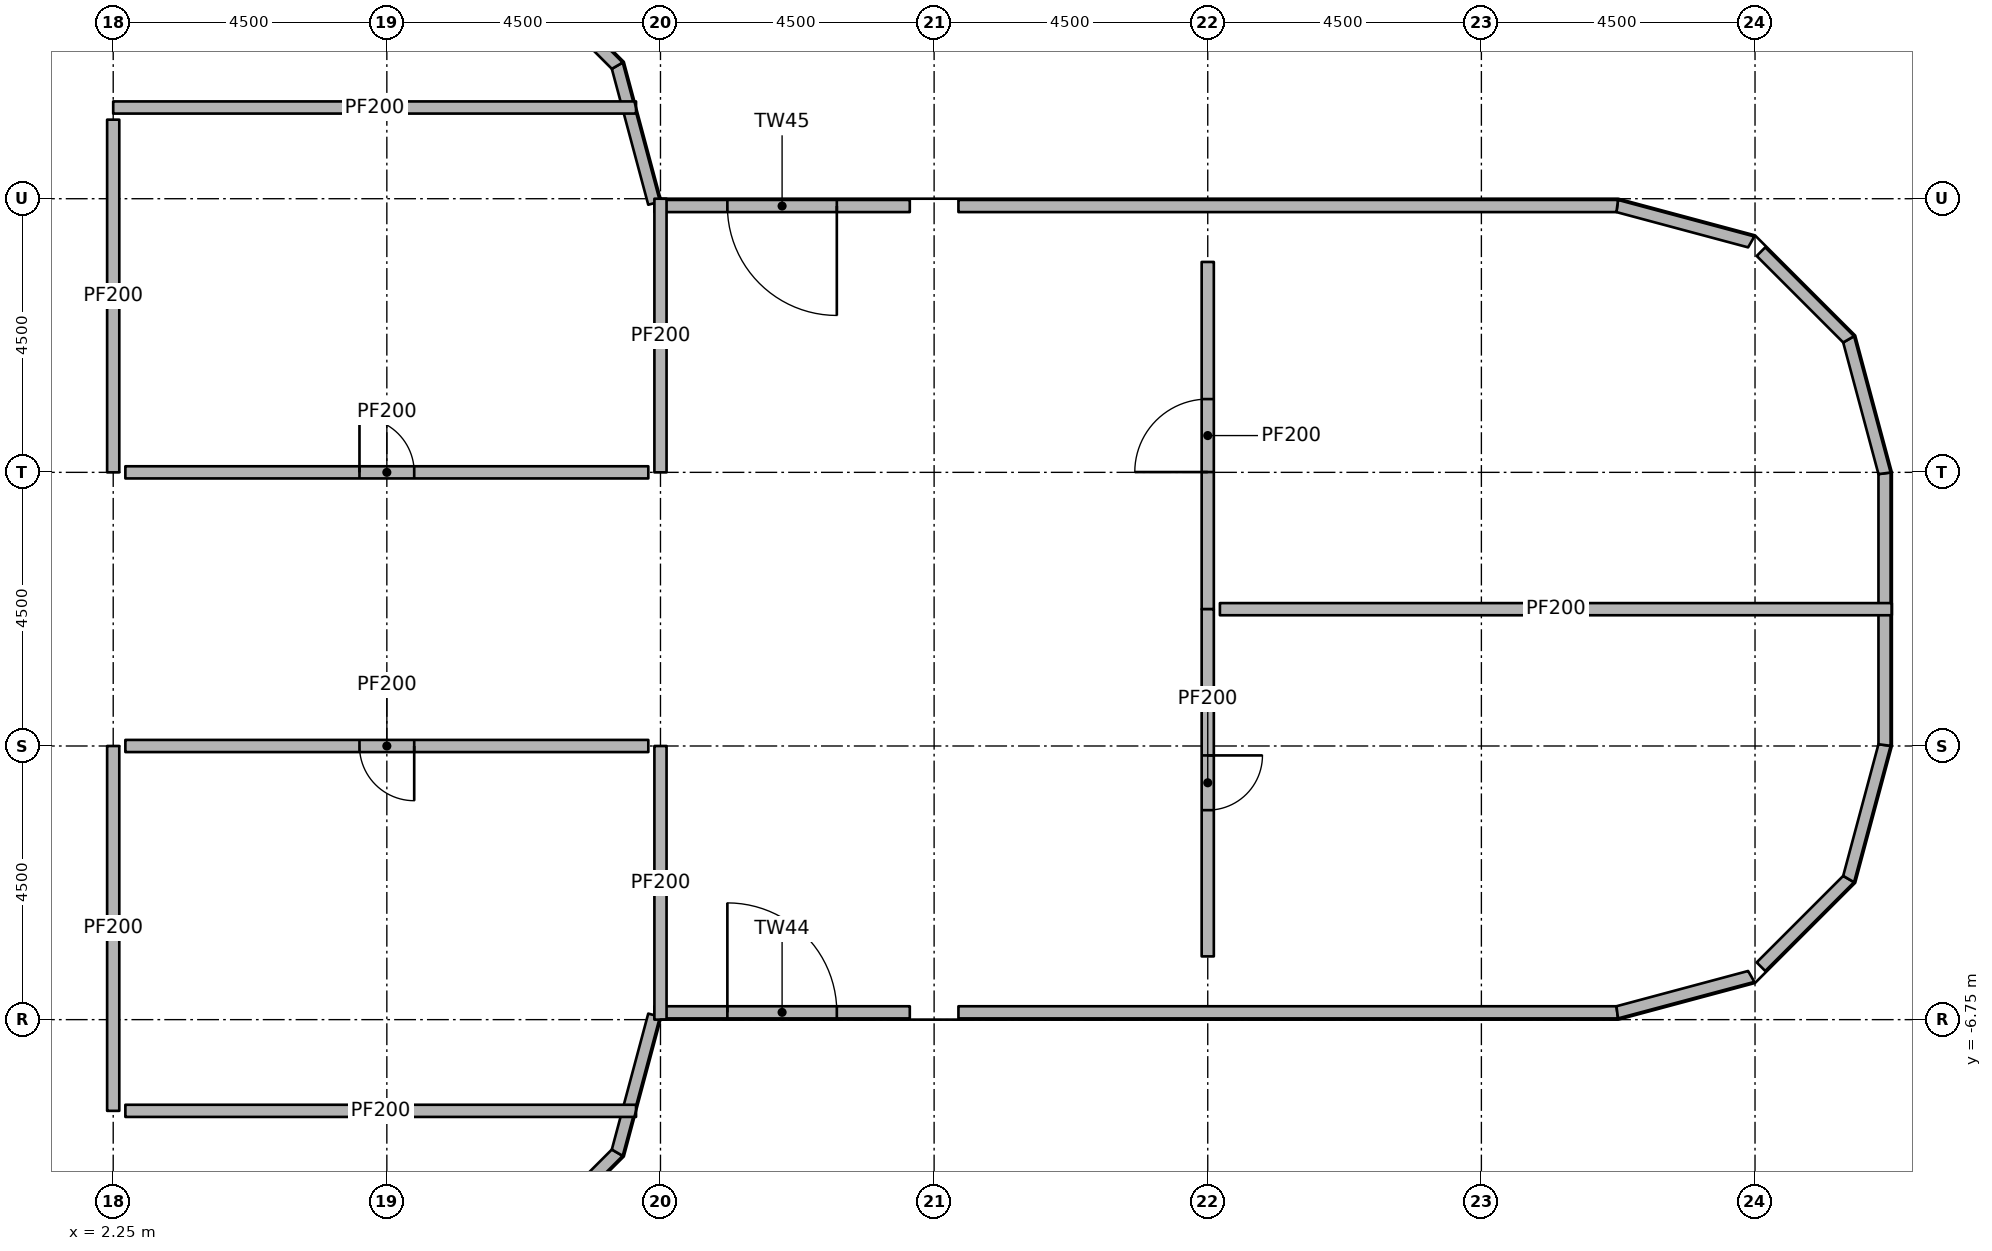
"""IFC4 building model, lengths in metres.
Left out: names, types, materials, properties, quantities, classifications, styles, units other than length and angle.
Written with IfcOpenShell. Run it as: python <this file> out.ifc"""

import sys

from ifc_helpers import new_model, si_unit, direction, frame, frame_2d, origin, origin_2d, place, context, subcontext, project, spatial, polyline, rectangle, outline, extrude, element, fill, save


model = new_model("IFC4")
c1 = context("Model", 3, precision=1e-05, world=origin(), true_north=direction((0.0, 1.0)))
c2 = subcontext(c1, "Body", "Model", "MODEL_VIEW")
j1 = project(units=[si_unit("LENGTHUNIT", "METRE"), si_unit("PLANEANGLEUNIT", "RADIAN")], contexts=[c1])
p1 = place(None, origin())
s1 = spatial("IfcSite", under=j1, at=p1, CompositionType="ELEMENT")
p2 = place(p1, origin())
s2 = spatial("IfcBuilding", under=s1, at=p2, CompositionType="ELEMENT")
p3 = place(p2, frame((0.0, 0.0, 190.4)))
s3 = spatial("IfcBuildingStorey", under=s2, at=p3, CompositionType="ELEMENT", Elevation=190.4)
for number, where, z_axis, x_axis in (
    (1, (6.25, -6.25, 0.0), (0.0, 0.0, 1.0), (1.0, 0.0, 0.0)),
    (2, (6.25, 6.25, 0.0), (0.0, 0.0, 1.0), (1.0, 0.0, 0.0)),
    (3, (10.75, -6.25, 0.0), (0.0, 0.0, 1.0), (1.0, 0.0, 0.0)),
    (4, (10.75, 6.25, 0.0), (0.0, 0.0, 1.0), (1.0, 0.0, 0.0)),
    (5, (15.75, -6.25, 0.0), (0.0, 0.0, 1.0), (1.0, 0.0, 0.0)),
    (6, (15.75, 6.25, 0.0), (0.0, 0.0, 1.0), (1.0, 0.0, 0.0)),
    (7, (20.25, -6.11, 0.0), (0.0, 0.0, 1.0), (1.0, 0.0, 0.0)),
    (8, (20.25, 6.11, 0.0), (0.0, 0.0, 1.0), (1.0, 0.0, 0.0)),
    (9, (24.75, -6.11, 0.0), (0.0, 0.0, 1.0), (1.0, 0.0, 0.0)),
    (10, (24.75, 6.11, 0.0), (0.0, 0.0, 1.0), (1.0, 0.0, 0.0)),
    (11, (28.908, -5.475, 0.0), (0.0, 0.0, 1.0), (1.0, 0.0, 0.0)),
    (12, (28.67, -2.25, 0.0), (0.0, 0.0, 1.0), (1.0, 0.0, 0.0)),
    (13, (28.67, 2.25, 0.0), (0.0, 0.0, 1.0), (1.0, 0.0, 0.0)),
    (14, (28.908, 5.475, 0.0), (0.0, 0.0, 1.0), (1.0, 0.0, 0.0)),
):
    element("IfcColumn", number, at=place(p3, frame(where, z_axis=z_axis, x_axis=x_axis)), inside=s3, PredefinedType="COLUMN", context=c2, shape_type="SweptSolid", body=[
        extrude(rectangle(XDim=0.8, YDim=0.8, at=origin_2d()), origin(), (0.0, 0.0, 1.0), 4.85),
    ])
p4 = place(p3, origin())
e15 = element("IfcWall", 15, at=p4, inside=s3, PredefinedType="SOLIDWALL", context=c2, shape_type="SweptSolid", body=[
    extrude(outline(polyline([(8.99, -10.629), (10.629, -8.99), (10.45, -8.886), (8.886, -10.45), (8.99, -10.629)])), origin(), (0.0, 0.0, 1.0), 4.85),
])
p5 = place(p3, origin())
e16 = element("IfcWall", 16, at=p5, inside=s3, PredefinedType="SOLIDWALL", context=c2, shape_type="SweptSolid", body=[
    extrude(outline(polyline([(10.629, -8.99), (11.242, -6.702), (11.049, -6.651), (10.45, -8.886), (10.629, -8.99)])), origin(), (0.0, 0.0, 1.0), 4.85),
])
p6 = place(p3, frame((11.15, -6.63, 0.0), z_axis=(0.0, 0.0, 1.0), x_axis=(1.0, 0.0, 0.0)))
e17 = element("IfcWall", 17, at=p6, inside=s3, PredefinedType="SOLIDWALL", context=c2, shape_type="SweptSolid", body=[
    extrude(rectangle(XDim=4.2, YDim=0.2, at=frame_2d((2.1, 0.0))), origin(), (0.0, 0.0, 1.0), 4.85),
])
p7 = place(p6, frame((1.2, 0.0, 0.0)))
e18 = element("IfcOpeningElement", 18, at=p7, cuts=e17, PredefinedType="OPENING", context=c2, shape_type="SweptSolid", body=[
    extrude(rectangle(XDim=1.8, YDim=2.4, at=frame_2d((0.9, 1.2))), frame((0.0, 0.11, 0.0), z_axis=(0.0, -1.0, 0.0), x_axis=(1.0, 0.0, 0.0)), (0.0, 0.0, 1.0), 0.22),
])
p8 = place(p3, origin())
e19 = element("IfcWall", 19, at=p8, inside=s3, PredefinedType="SOLIDWALL", context=c2, shape_type="SweptSolid", body=[
    extrude(outline(polyline([(16.15, -6.73), (26.997, -6.73), (26.971, -6.53), (16.15, -6.53), (16.15, -6.73)])), origin(), (0.0, 0.0, 1.0), 4.85),
])
p9 = place(p3, origin())
e20 = element("IfcWall", 20, at=p9, inside=s3, PredefinedType="SOLIDWALL", context=c2, shape_type="SweptSolid", body=[
    extrude(outline(polyline([(26.997, -6.73), (29.24, -6.129), (29.136, -5.95), (26.971, -6.53), (26.997, -6.73)])), origin(), (0.0, 0.0, 1.0), 4.85),
])
p10 = place(p3, origin())
e21 = element("IfcWall", 21, at=p10, inside=s3, PredefinedType="SOLIDWALL", context=c2, shape_type="SweptSolid", body=[
    extrude(outline(polyline([(29.419, -5.95), (30.879, -4.49), (30.7, -4.386), (29.277, -5.809), (29.419, -5.95)])), origin(), (0.0, 0.0, 1.0), 4.85),
])
p11 = place(p3, origin())
e22 = element("IfcWall", 22, at=p11, inside=s3, PredefinedType="SOLIDWALL", context=c2, shape_type="SweptSolid", body=[
    extrude(outline(polyline([(30.879, -4.49), (31.48, -2.247), (31.28, -2.221), (30.7, -4.386), (30.879, -4.49)])), origin(), (0.0, 0.0, 1.0), 4.85),
])
p12 = place(p3, origin())
e23 = element("IfcWall", 23, at=p12, inside=s3, PredefinedType="SOLIDWALL", context=c2, shape_type="SweptSolid", body=[
    extrude(outline(polyline([(31.48, -2.247), (31.48, 2.247), (31.28, 2.221), (31.28, -2.221), (31.48, -2.247)])), origin(), (0.0, 0.0, 1.0), 4.85),
])
p13 = place(p3, origin())
e24 = element("IfcWall", 24, at=p13, inside=s3, PredefinedType="SOLIDWALL", context=c2, shape_type="SweptSolid", body=[
    extrude(outline(polyline([(31.48, 2.247), (30.879, 4.49), (30.7, 4.386), (31.28, 2.221), (31.48, 2.247)])), origin(), (0.0, 0.0, 1.0), 4.85),
])
p14 = place(p3, origin())
e25 = element("IfcWall", 25, at=p14, inside=s3, PredefinedType="SOLIDWALL", context=c2, shape_type="SweptSolid", body=[
    extrude(outline(polyline([(30.879, 4.49), (29.419, 5.95), (29.277, 5.809), (30.7, 4.386), (30.879, 4.49)])), origin(), (0.0, 0.0, 1.0), 4.85),
])
p15 = place(p3, origin())
e26 = element("IfcWall", 26, at=p15, inside=s3, PredefinedType="SOLIDWALL", context=c2, shape_type="SweptSolid", body=[
    extrude(outline(polyline([(29.24, 6.129), (26.997, 6.73), (26.971, 6.53), (29.136, 5.95), (29.24, 6.129)])), origin(), (0.0, 0.0, 1.0), 4.85),
])
p16 = place(p3, origin())
e27 = element("IfcWall", 27, at=p16, inside=s3, PredefinedType="SOLIDWALL", context=c2, shape_type="SweptSolid", body=[
    extrude(outline(polyline([(26.997, 6.73), (16.15, 6.73), (16.15, 6.53), (26.971, 6.53), (26.997, 6.73)])), origin(), (0.0, 0.0, 1.0), 4.85),
])
p17 = place(p3, frame((15.35, 6.63, 0.0), z_axis=(0.0, 0.0, 1.0), x_axis=(-1.0, 0.0, 0.0)))
e28 = element("IfcWall", 28, at=p17, inside=s3, PredefinedType="SOLIDWALL", context=c2, shape_type="SweptSolid", body=[
    extrude(rectangle(XDim=4.2, YDim=0.2, at=frame_2d((2.1, 0.0))), origin(), (0.0, 0.0, 1.0), 4.85),
])
p18 = place(p17, frame((1.2, 0.0, 0.0)))
e29 = element("IfcOpeningElement", 29, at=p18, cuts=e28, PredefinedType="OPENING", context=c2, shape_type="SweptSolid", body=[
    extrude(rectangle(XDim=1.8, YDim=2.4, at=frame_2d((0.9, 1.2))), frame((0.0, 0.11, 0.0), z_axis=(0.0, -1.0, 0.0), x_axis=(1.0, 0.0, 0.0)), (0.0, 0.0, 1.0), 0.22),
])
p19 = place(p3, origin())
e30 = element("IfcWall", 30, at=p19, inside=s3, PredefinedType="SOLIDWALL", context=c2, shape_type="SweptSolid", body=[
    extrude(outline(polyline([(11.242, 6.702), (10.629, 8.99), (10.45, 8.886), (11.049, 6.651), (11.242, 6.702)])), origin(), (0.0, 0.0, 1.0), 4.85),
])
p20 = place(p3, origin())
e31 = element("IfcWall", 31, at=p20, inside=s3, PredefinedType="SOLIDWALL", context=c2, shape_type="SweptSolid", body=[
    extrude(outline(polyline([(10.629, 8.99), (8.99, 10.629), (8.886, 10.45), (10.45, 8.886), (10.629, 8.99)])), origin(), (0.0, 0.0, 1.0), 4.85),
])
p21 = place(p3, frame((10.848, 8.25, 0.0), z_axis=(0.0, 0.0, 1.0), x_axis=(-1.0, 0.0, 0.0)))
e32 = element("IfcWall", 32, at=p21, inside=s3, PredefinedType="PARTITIONING", context=c2, shape_type="SweptSolid", body=[
    extrude(rectangle(XDim=8.598, YDim=0.2, at=frame_2d((4.299, 0.0))), origin(), (0.0, 0.0, 1.0), 3.93),
])
p22 = place(p3, frame((2.25, 8.05, 0.0), z_axis=(0.0, 0.0, 1.0), x_axis=(0.0, -1.0, 0.0)))
e33 = element("IfcWall", 33, at=p22, inside=s3, PredefinedType="PARTITIONING", context=c2, shape_type="SweptSolid", body=[
    extrude(rectangle(XDim=5.8, YDim=0.2, at=frame_2d((2.9, 0.0))), origin(), (0.0, 0.0, 1.0), 3.994),
])
p23 = place(p3, frame((2.25, -2.25, 0.0), z_axis=(0.0, 0.0, 1.0), x_axis=(0.0, -1.0, 0.0)))
e34 = element("IfcWall", 34, at=p23, inside=s3, PredefinedType="PARTITIONING", context=c2, shape_type="SweptSolid", body=[
    extrude(rectangle(XDim=6.0, YDim=0.2, at=frame_2d((3.0, 0.0))), origin(), (0.0, 0.0, 1.0), 3.994),
])
p24 = place(p3, frame((2.45, -8.25, 0.0), z_axis=(0.0, 0.0, 1.0), x_axis=(1.0, 0.0, 0.0)))
e35 = element("IfcWall", 35, at=p24, inside=s3, PredefinedType="PARTITIONING", context=c2, shape_type="SweptSolid", body=[
    extrude(rectangle(XDim=8.398, YDim=0.2, at=frame_2d((4.199, 0.0))), origin(), (0.0, 0.0, 1.0), 3.93),
])
p25 = place(p3, frame((11.25, 6.75, 0.0), z_axis=(0.0, 0.0, 1.0), x_axis=(0.0, -1.0, 0.0)))
e36 = element("IfcWall", 36, at=p25, inside=s3, PredefinedType="PARTITIONING", context=c2, shape_type="SweptSolid", body=[
    extrude(rectangle(XDim=4.5, YDim=0.2, at=frame_2d((2.25, 0.0))), origin(), (0.0, 0.0, 1.0), 3.93),
])
p26 = place(p3, frame((2.45, 2.25, 0.0), z_axis=(0.0, 0.0, 1.0), x_axis=(1.0, 0.0, 0.0)))
e37 = element("IfcWall", 37, at=p26, inside=s3, PredefinedType="PARTITIONING", context=c2, shape_type="SweptSolid", body=[
    extrude(rectangle(XDim=8.6, YDim=0.2, at=frame_2d((4.3, 0.0))), origin(), (0.0, 0.0, 1.0), 4.152),
])
p27 = place(p26, frame((3.85, 0.0, 0.0)))
e38 = element("IfcOpeningElement", 38, at=p27, cuts=e37, PredefinedType="OPENING", context=c2, shape_type="SweptSolid", body=[
    extrude(rectangle(XDim=0.9, YDim=2.1, at=frame_2d((0.45, 1.05))), frame((0.0, 0.11, 0.0), z_axis=(0.0, -1.0, 0.0), x_axis=(1.0, 0.0, 0.0)), (0.0, 0.0, 1.0), 0.22),
])
p28 = place(p3, frame((11.25, -2.25, 0.0), z_axis=(0.0, 0.0, 1.0), x_axis=(0.0, -1.0, 0.0)))
e39 = element("IfcWall", 39, at=p28, inside=s3, PredefinedType="PARTITIONING", context=c2, shape_type="SweptSolid", body=[
    extrude(rectangle(XDim=4.5, YDim=0.2, at=frame_2d((2.25, 0.0))), origin(), (0.0, 0.0, 1.0), 3.93),
])
p29 = place(p3, frame((11.05, -2.25, 0.0), z_axis=(0.0, 0.0, 1.0), x_axis=(-1.0, 0.0, 0.0)))
e40 = element("IfcWall", 40, at=p29, inside=s3, PredefinedType="PARTITIONING", context=c2, shape_type="SweptSolid", body=[
    extrude(rectangle(XDim=8.6, YDim=0.2, at=frame_2d((4.3, 0.0))), origin(), (0.0, 0.0, 1.0), 4.152),
])
p30 = place(p29, frame((3.85, 0.0, 0.0)))
e41 = element("IfcOpeningElement", 41, at=p30, cuts=e40, PredefinedType="OPENING", context=c2, shape_type="SweptSolid", body=[
    extrude(rectangle(XDim=0.9, YDim=2.1, at=frame_2d((0.45, 1.05))), frame((0.0, 0.11, 0.0), z_axis=(0.0, -1.0, 0.0), x_axis=(1.0, 0.0, 0.0)), (0.0, 0.0, 1.0), 0.22),
])
p31 = place(p3, frame((20.25, 0.0, 0.0), z_axis=(0.0, 0.0, 1.0), x_axis=(0.0, 1.0, 0.0)))
e42 = element("IfcWall", 42, at=p31, inside=s3, PredefinedType="PARTITIONING", context=c2, shape_type="SweptSolid", body=[
    extrude(rectangle(XDim=5.71, YDim=0.2, at=frame_2d((2.855, 0.0))), origin(), (0.0, 0.0, 1.0), 4.152),
])
p32 = place(p31, frame((2.255, 0.0, 0.0)))
e43 = element("IfcOpeningElement", 43, at=p32, cuts=e42, PredefinedType="OPENING", context=c2, shape_type="SweptSolid", body=[
    extrude(rectangle(XDim=1.2, YDim=2.1, at=frame_2d((0.6, 1.05))), frame((0.0, 0.11, 0.0), z_axis=(0.0, -1.0, 0.0), x_axis=(1.0, 0.0, 0.0)), (0.0, 0.0, 1.0), 0.22),
])
p33 = place(p3, frame((20.25, 0.0, 0.0), z_axis=(0.0, 0.0, 1.0), x_axis=(0.0, -1.0, 0.0)))
e44 = element("IfcWall", 44, at=p33, inside=s3, PredefinedType="PARTITIONING", context=c2, shape_type="SweptSolid", body=[
    extrude(rectangle(XDim=5.71, YDim=0.2, at=frame_2d((2.855, 0.0))), origin(), (0.0, 0.0, 1.0), 4.152),
])
p34 = place(p33, frame((2.405, 0.0, 0.0)))
e45 = element("IfcOpeningElement", 45, at=p34, cuts=e44, PredefinedType="OPENING", context=c2, shape_type="SweptSolid", body=[
    extrude(rectangle(XDim=0.9, YDim=2.1, at=frame_2d((0.45, 1.05))), frame((0.0, 0.11, 0.0), z_axis=(0.0, -1.0, 0.0), x_axis=(1.0, 0.0, 0.0)), (0.0, 0.0, 1.0), 0.22),
])
p35 = place(p3, frame((31.5, 0.0, 0.0), z_axis=(0.0, 0.0, 1.0), x_axis=(-1.0, 0.0, 0.0)))
e46 = element("IfcWall", 46, at=p35, inside=s3, PredefinedType="PARTITIONING", context=c2, shape_type="SweptSolid", body=[
    extrude(rectangle(XDim=11.05, YDim=0.2, at=frame_2d((5.525, 0.0))), origin(), (0.0, 0.0, 1.0), 3.994),
])
p36 = place(p7, origin())
e47 = element("IfcDoor", 47, at=p36, inside=s3, OperationType="SINGLE_SWING_LEFT", PredefinedType="DOOR", context=c2, shape_type="SweptSolid", body=[
    extrude(rectangle(XDim=1.8, YDim=2.4, at=frame_2d((0.9, 1.2))), frame((0.0, 0.025, 0.0), z_axis=(0.0, -1.0, 0.0), x_axis=(1.0, 0.0, 0.0)), (0.0, 0.0, 1.0), 0.05),
])
fill(e18, e47)
p37 = place(p18, origin())
e48 = element("IfcDoor", 48, at=p37, inside=s3, OperationType="SINGLE_SWING_LEFT", PredefinedType="DOOR", context=c2, shape_type="SweptSolid", body=[
    extrude(rectangle(XDim=1.8, YDim=2.4, at=frame_2d((0.9, 1.2))), frame((0.0, 0.025, 0.0), z_axis=(0.0, -1.0, 0.0), x_axis=(1.0, 0.0, 0.0)), (0.0, 0.0, 1.0), 0.05),
])
fill(e29, e48)
p38 = place(p27, origin())
e49 = element("IfcDoor", 49, at=p38, inside=s3, OperationType="SINGLE_SWING_LEFT", PredefinedType="DOOR", context=c2, shape_type="SweptSolid", body=[
    extrude(rectangle(XDim=0.9, YDim=2.1, at=frame_2d((0.45, 1.05))), frame((0.0, 0.025, 0.0), z_axis=(0.0, -1.0, 0.0), x_axis=(1.0, 0.0, 0.0)), (0.0, 0.0, 1.0), 0.05),
])
fill(e38, e49)
p39 = place(p30, origin())
e50 = element("IfcDoor", 50, at=p39, inside=s3, OperationType="SINGLE_SWING_LEFT", PredefinedType="DOOR", context=c2, shape_type="SweptSolid", body=[
    extrude(rectangle(XDim=0.9, YDim=2.1, at=frame_2d((0.45, 1.05))), frame((0.0, 0.025, 0.0), z_axis=(0.0, -1.0, 0.0), x_axis=(1.0, 0.0, 0.0)), (0.0, 0.0, 1.0), 0.05),
])
fill(e41, e50)
p40 = place(p32, origin())
e51 = element("IfcDoor", 51, at=p40, inside=s3, OperationType="SINGLE_SWING_LEFT", PredefinedType="DOOR", context=c2, shape_type="SweptSolid", body=[
    extrude(rectangle(XDim=1.2, YDim=2.1, at=frame_2d((0.6, 1.05))), frame((0.0, 0.025, 0.0), z_axis=(0.0, -1.0, 0.0), x_axis=(1.0, 0.0, 0.0)), (0.0, 0.0, 1.0), 0.05),
])
fill(e43, e51)
p41 = place(p34, origin())
e52 = element("IfcDoor", 52, at=p41, inside=s3, OperationType="SINGLE_SWING_LEFT", PredefinedType="DOOR", context=c2, shape_type="SweptSolid", body=[
    extrude(rectangle(XDim=0.9, YDim=2.1, at=frame_2d((0.45, 1.05))), frame((0.0, 0.025, 0.0), z_axis=(0.0, -1.0, 0.0), x_axis=(1.0, 0.0, 0.0)), (0.0, 0.0, 1.0), 0.05),
])
fill(e45, e52)
save(model, sys.argv[1])
